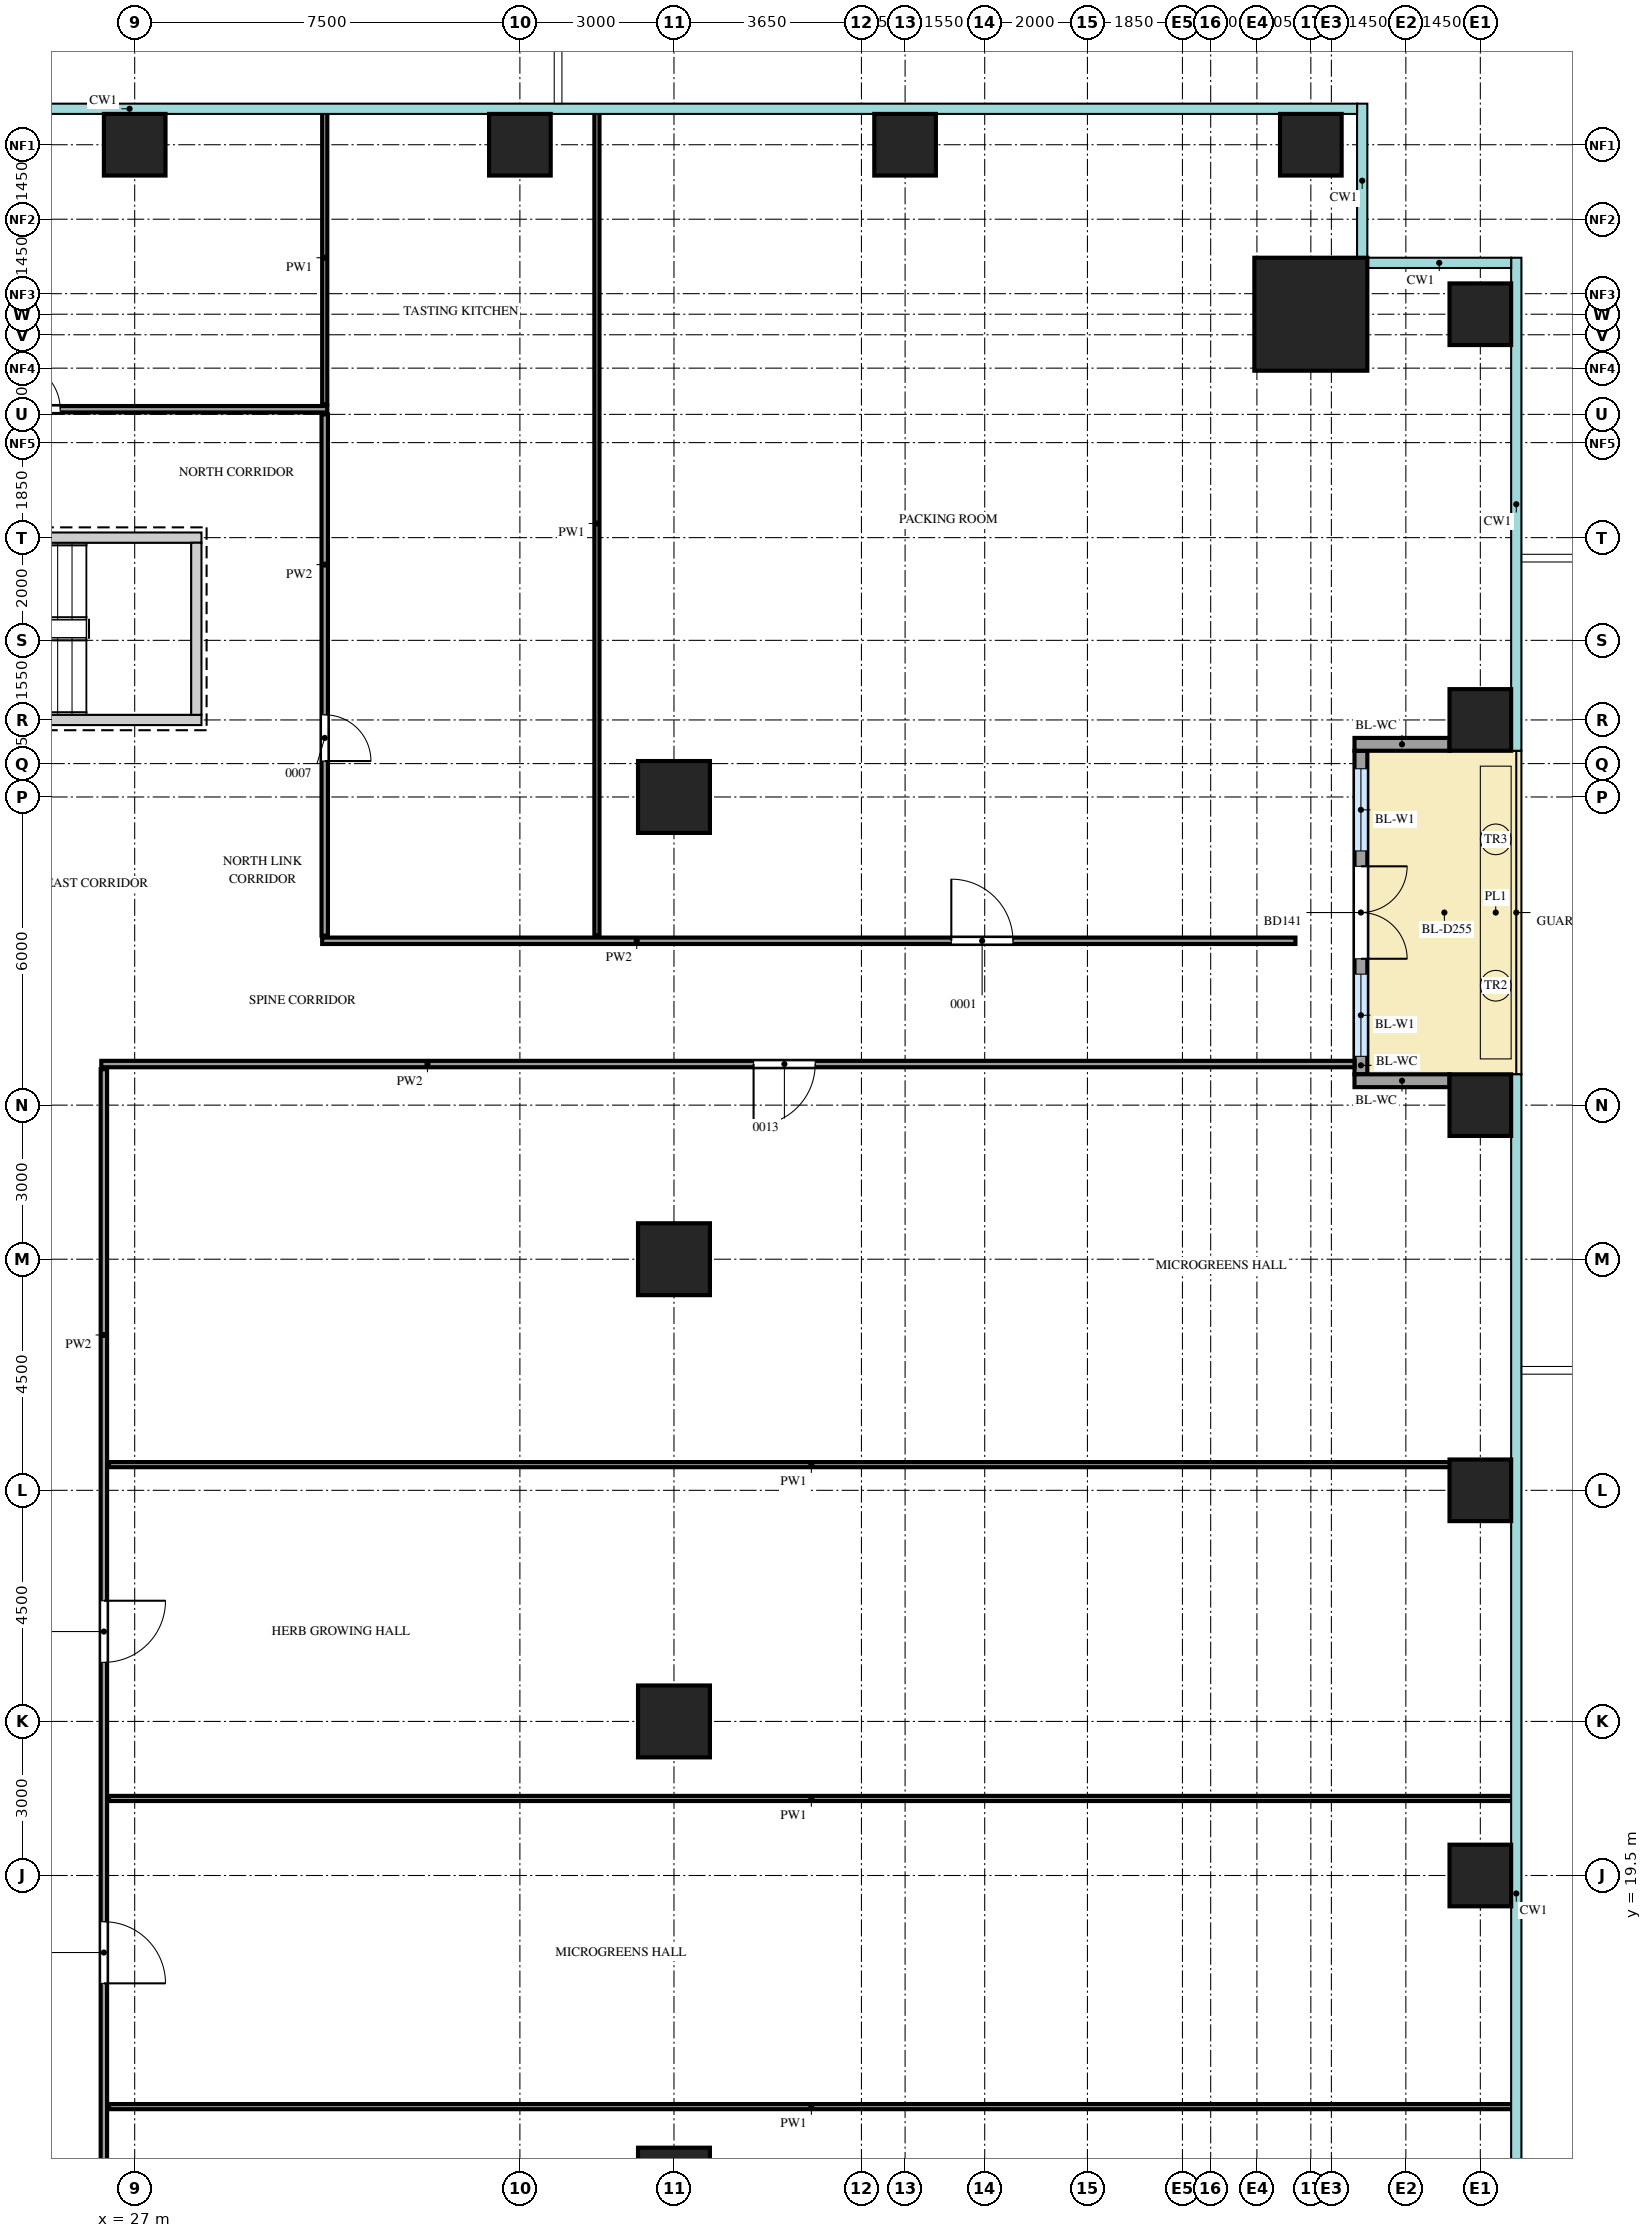
"""IFC4 building model, lengths in metres.
Left out: names, types, materials, properties, quantities, classifications, styles, units other than length and angle.
Written with IfcOpenShell. Run it as: python <this file> out.ifc"""

import sys

from ifc_helpers import new_model, si_unit, direction, frame, frame_2d, origin, origin_2d, place, context, subcontext, project, spatial, rectangle, extrude, source, transform, mapped, element, fill, save


model = new_model("IFC4")
c1 = context("Model", 3, precision=1e-05, world=origin(), true_north=direction((0.0, 1.0)))
c2 = subcontext(c1, "Body", "Model", "MODEL_VIEW")
j1 = project(units=[si_unit("LENGTHUNIT", "METRE"), si_unit("PLANEANGLEUNIT", "RADIAN")], contexts=[c1])
p1 = place(None, origin())
s1 = spatial("IfcSite", under=j1, at=p1, CompositionType="ELEMENT")
p2 = place(p1, origin())
s2 = spatial("IfcBuilding", under=s1, at=p2, CompositionType="ELEMENT")
p3 = place(p2, frame((0.0, 0.0, 69.0)))
s3 = spatial("IfcBuildingStorey", under=s2, at=p3, CompositionType="ELEMENT", Elevation=69.0)
m1 = source(origin(), c2, "Body", "SweptSolid", [
    extrude(rectangle(XDim=7.1, YDim=0.2, at=frame_2d((3.55, 0.0))), origin(), (0.0, 0.0, 1.0), 4.2),
])
p4 = place(p3, frame((21.2, 45.55, 0.0), z_axis=(0.0, 0.0, 1.0), x_axis=(1.0, 0.0, 0.0)))
e1 = element("IfcWall", 1, at=p4, inside=s3, PredefinedType="SHEAR", context=c2, shape_type="MappedRepresentation", body=[
    mapped(m1, transform((0.0, 0.0, 0.0))),
])
m2 = source(origin(), c2, "Body", "SweptSolid", [
    extrude(rectangle(XDim=1.2, YDim=2.1, at=frame_2d((0.6, 1.05))), frame((0.0, 0.11, 0.0), z_axis=(0.0, -1.0, 0.0), x_axis=(1.0, 0.0, 0.0)), (0.0, 0.0, 1.0), 0.22),
])
p5 = place(p4, frame((0.15, 0.0, 0.0)))
e2 = element("IfcOpeningElement", 2, at=p5, cuts=e1, PredefinedType="OPENING", context=c2, shape_type="MappedRepresentation", body=[
    mapped(m2, transform((0.0, 0.0, 0.0))),
])
p6 = place(p3, frame((21.2, 42.0, 0.0), z_axis=(0.0, 0.0, 1.0), x_axis=(1.0, 0.0, 0.0)))
e3 = element("IfcWall", 3, at=p6, inside=s3, PredefinedType="SHEAR", context=c2, shape_type="MappedRepresentation", body=[
    mapped(m1, transform((0.0, 0.0, 0.0))),
])
m3 = source(origin(), c2, "Body", "SweptSolid", [
    extrude(rectangle(XDim=3.35, YDim=0.2, at=frame_2d((1.675, 0.0))), origin(), (0.0, 0.0, 1.0), 4.2),
])
p7 = place(p3, frame((28.2, 42.1, 0.0), z_axis=(0.0, 0.0, 1.0), x_axis=(0.0, 1.0, 0.0)))
e4 = element("IfcWall", 4, at=p7, inside=s3, PredefinedType="SHEAR", context=c2, shape_type="MappedRepresentation", body=[
    mapped(m3, transform((0.0, 0.0, 0.0))),
])
m4 = source(origin(), c2, "Body", "SweptSolid", [
    extrude(rectangle(XDim=2.2, YDim=2.2, at=origin_2d()), origin(), (0.0, 0.0, 1.0), 4.5),
])
p8 = place(p3, frame((49.9, 49.9, 0.0), z_axis=(0.0, 0.0, 1.0), x_axis=(1.0, 0.0, 0.0)))
e5 = element("IfcColumn", 5, at=p8, inside=s3, PredefinedType="COLUMN", context=c2, shape_type="MappedRepresentation", body=[
    mapped(m4, transform((0.0, 0.0, 0.0))),
])
m5 = source(origin(), c2, "Body", "SweptSolid", [
    extrude(rectangle(XDim=1.2, YDim=1.2, at=origin_2d()), origin(), (0.0, 0.0, 1.0), 4.2),
])
for number, where, z_axis, x_axis in (
    (6, (53.2, 19.5, 0.0), (0.0, 0.0, 1.0), (1.0, 0.0, 0.0)),
    (7, (53.2, 27.0, 0.0), (0.0, 0.0, 1.0), (1.0, 0.0, 0.0)),
    (8, (53.2, 34.5, 0.0), (0.0, 0.0, 1.0), (1.0, 0.0, 0.0)),
    (9, (53.2, 42.0, 0.0), (0.0, 0.0, 1.0), (1.0, 0.0, 0.0)),
    (10, (53.2, 49.9, 0.0), (0.0, 0.0, 1.0), (1.0, 0.0, 0.0)),
    (11, (27.0, 53.2, 0.0), (0.0, 0.0, 1.0), (1.0, 0.0, 0.0)),
    (12, (34.5, 53.2, 0.0), (0.0, 0.0, 1.0), (1.0, 0.0, 0.0)),
    (13, (42.0, 53.2, 0.0), (0.0, 0.0, 1.0), (1.0, 0.0, 0.0)),
    (14, (49.9, 53.2, 0.0), (0.0, 0.0, 1.0), (1.0, 0.0, 0.0)),
):
    element("IfcColumn", number, at=place(p3, frame(where, z_axis=z_axis, x_axis=x_axis)), inside=s3, PredefinedType="COLUMN", context=c2, shape_type="MappedRepresentation", body=[
        mapped(m5, transform((0.0, 0.0, 0.0))),
    ])
m6 = source(origin(), c2, "Body", "SweptSolid", [
    extrude(rectangle(XDim=1.4, YDim=1.4, at=origin_2d()), origin(), (0.0, 0.0, 1.0), 4.2),
])
for number, where, z_axis, x_axis in (
    (15, (37.5, 13.5, 0.0), (0.0, 0.0, 1.0), (1.0, 0.0, 0.0)),
    (16, (37.5, 22.5, 0.0), (0.0, 0.0, 1.0), (1.0, 0.0, 0.0)),
    (17, (37.5, 31.5, 0.0), (0.0, 0.0, 1.0), (1.0, 0.0, 0.0)),
    (18, (37.5, 40.5, 0.0), (0.0, 0.0, 1.0), (1.0, 0.0, 0.0)),
):
    element("IfcColumn", number, at=place(p3, frame(where, z_axis=z_axis, x_axis=x_axis)), inside=s3, PredefinedType="COLUMN", context=c2, shape_type="MappedRepresentation", body=[
        mapped(m6, transform((0.0, 0.0, 0.0))),
    ])
m7 = source(origin(), c2, "Body", "SweptSolid", [
    extrude(rectangle(XDim=6.3, YDim=0.25, at=frame_2d((3.15, 0.0))), origin(), (0.0, 0.0, 1.0), 3.6),
])
p9 = place(p3, frame((50.875, 35.1, 0.0), z_axis=(0.0, 0.0, 1.0), x_axis=(0.0, 1.0, 0.0)))
e19 = element("IfcWall", 19, at=p9, inside=s3, PredefinedType="SOLIDWALL", context=c2, shape_type="MappedRepresentation", body=[
    mapped(m7, transform((0.0, 0.0, 0.0))),
])
m8 = source(origin(), c2, "Body", "SweptSolid", [
    extrude(rectangle(XDim=1.6, YDim=2.4, at=frame_2d((0.8, 1.2))), frame((0.0, 0.135, 0.0), z_axis=(0.0, -1.0, 0.0), x_axis=(1.0, 0.0, 0.0)), (0.0, 0.0, 1.0), 0.27),
])
p10 = place(p9, frame((0.35, 0.0, 0.0)))
e20 = element("IfcOpeningElement", 20, at=p10, cuts=e19, PredefinedType="OPENING", context=c2, shape_type="MappedRepresentation", body=[
    mapped(m8, transform((0.0, 0.0, 0.0))),
])
p11 = place(p9, frame((4.35, 0.0, 0.0)))
e21 = element("IfcOpeningElement", 21, at=p11, cuts=e19, PredefinedType="OPENING", context=c2, shape_type="MappedRepresentation", body=[
    mapped(m8, transform((0.0, 0.0, 0.0))),
])
m9 = source(origin(), c2, "Body", "SweptSolid", [
    extrude(rectangle(XDim=1.8, YDim=2.4, at=frame_2d((0.9, 1.2))), frame((0.0, 0.135, 0.0), z_axis=(0.0, -1.0, 0.0), x_axis=(1.0, 0.0, 0.0)), (0.0, 0.0, 1.0), 0.27),
])
p12 = place(p9, frame((2.25, 0.0, 0.0)))
e22 = element("IfcOpeningElement", 22, at=p12, cuts=e19, PredefinedType="OPENING", context=c2, shape_type="MappedRepresentation", body=[
    mapped(m9, transform((0.0, 0.0, 0.0))),
])
m10 = source(origin(), c2, "Body", "SweptSolid", [
    extrude(rectangle(XDim=1.85, YDim=0.25, at=frame_2d((0.925, 0.0))), origin(), (0.0, 0.0, 1.0), 3.6),
])
for number, where, z_axis, x_axis in (
    (23, (52.6, 34.975, 0.0), (0.0, 0.0, 1.0), (-1.0, 0.0, 0.0)),
    (24, (52.6, 41.525, 0.0), (0.0, 0.0, 1.0), (-1.0, 0.0, 0.0)),
):
    element("IfcWall", number, at=place(p3, frame(where, z_axis=z_axis, x_axis=x_axis)), inside=s3, PredefinedType="SOLIDWALL", context=c2, shape_type="MappedRepresentation", body=[
        mapped(m10, transform((0.0, 0.0, 0.0))),
    ])
m11 = source(origin(), c2, "Body", "SweptSolid", [
    extrude(rectangle(XDim=29.05, YDim=0.125, at=frame_2d((14.525, 0.0))), origin(), (0.0, 0.0, 1.0), 4.3),
])
p13 = place(p3, frame((26.4, 6.15, 0.0), z_axis=(0.0, 0.0, 1.0), x_axis=(0.0, 1.0, 0.0)))
e25 = element("IfcWall", 25, at=p13, inside=s3, PredefinedType="PARTITIONING", context=c2, shape_type="MappedRepresentation", body=[
    mapped(m11, transform((0.0, 0.0, 0.0))),
])
m12 = source(origin(), c2, "Body", "SweptSolid", [
    extrude(rectangle(XDim=1.2, YDim=2.1, at=frame_2d((0.6, 1.05))), frame((0.0, 0.073, 0.0), z_axis=(0.0, -1.0, 0.0), x_axis=(1.0, 0.0, 0.0)), (0.0, 0.0, 1.0), 0.145),
])
p14 = place(p13, frame((0.5, 0.0, 0.0)))
e26 = element("IfcOpeningElement", 26, at=p14, cuts=e25, PredefinedType="OPENING", context=c2, shape_type="MappedRepresentation", body=[
    mapped(m12, transform((0.0, 0.0, 0.0))),
])
p15 = place(p13, frame((4.75, 0.0, 0.0)))
e27 = element("IfcOpeningElement", 27, at=p15, cuts=e25, PredefinedType="OPENING", context=c2, shape_type="MappedRepresentation", body=[
    mapped(m12, transform((0.0, 0.0, 0.0))),
])
p16 = place(p13, frame((11.25, 0.0, 0.0)))
e28 = element("IfcOpeningElement", 28, at=p16, cuts=e25, PredefinedType="OPENING", context=c2, shape_type="MappedRepresentation", body=[
    mapped(m12, transform((0.0, 0.0, 0.0))),
])
p17 = place(p13, frame((17.5, 0.0, 0.0)))
e29 = element("IfcOpeningElement", 29, at=p17, cuts=e25, PredefinedType="OPENING", context=c2, shape_type="MappedRepresentation", body=[
    mapped(m12, transform((0.0, 0.0, 0.0))),
])
m13 = source(origin(), c2, "Body", "SweptSolid", [
    extrude(rectangle(XDim=27.35, YDim=0.1, at=frame_2d((13.675, 0.0))), origin(), (0.0, 0.0, 1.0), 4.3),
])
for number, where, z_axis, x_axis in (
    (30, (26.5, 15.0, 0.0), (0.0, 0.0, 1.0), (1.0, 0.0, 0.0)),
    (31, (26.5, 21.0, 0.0), (0.0, 0.0, 1.0), (1.0, 0.0, 0.0)),
    (32, (26.5, 27.5, 0.0), (0.0, 0.0, 1.0), (1.0, 0.0, 0.0)),
):
    element("IfcWall", number, at=place(p3, frame(where, z_axis=z_axis, x_axis=x_axis)), inside=s3, PredefinedType="PARTITIONING", context=c2, shape_type="MappedRepresentation", body=[
        mapped(m13, transform((0.0, 0.0, 0.0))),
    ])
m14 = source(origin(), c2, "Body", "SweptSolid", [
    extrude(rectangle(XDim=24.4, YDim=0.125, at=frame_2d((12.2, 0.0))), origin(), (0.0, 0.0, 1.0), 4.3),
])
p18 = place(p3, frame((26.35, 35.3, 0.0), z_axis=(0.0, 0.0, 1.0), x_axis=(1.0, 0.0, 0.0)))
e33 = element("IfcWall", 33, at=p18, inside=s3, PredefinedType="PARTITIONING", context=c2, shape_type="MappedRepresentation", body=[
    mapped(m14, transform((0.0, 0.0, 0.0))),
])
p19 = place(p18, frame((12.7, 0.0, 0.0)))
e34 = element("IfcOpeningElement", 34, at=p19, cuts=e33, PredefinedType="OPENING", context=c2, shape_type="MappedRepresentation", body=[
    mapped(m12, transform((0.0, 0.0, 0.0))),
])
m15 = source(origin(), c2, "Body", "SweptSolid", [
    extrude(rectangle(XDim=18.95, YDim=0.125, at=frame_2d((9.475, 0.0))), origin(), (0.0, 0.0, 1.0), 4.3),
])
p20 = place(p3, frame((30.65, 37.7, 0.0), z_axis=(0.0, 0.0, 1.0), x_axis=(1.0, 0.0, 0.0)))
e35 = element("IfcWall", 35, at=p20, inside=s3, PredefinedType="PARTITIONING", context=c2, shape_type="MappedRepresentation", body=[
    mapped(m15, transform((0.0, 0.0, 0.0))),
])
p21 = place(p20, frame((12.25, 0.0, 0.0)))
e36 = element("IfcOpeningElement", 36, at=p21, cuts=e35, PredefinedType="OPENING", context=c2, shape_type="MappedRepresentation", body=[
    mapped(m12, transform((0.0, 0.0, 0.0))),
])
m16 = source(origin(), c2, "Body", "SweptSolid", [
    extrude(rectangle(XDim=10.15, YDim=0.125, at=frame_2d((5.075, 0.0))), origin(), (0.0, 0.0, 1.0), 4.3),
])
p22 = place(p3, frame((30.7, 37.8, 0.0), z_axis=(0.0, 0.0, 1.0), x_axis=(0.0, 1.0, 0.0)))
e37 = element("IfcWall", 37, at=p22, inside=s3, PredefinedType="PARTITIONING", context=c2, shape_type="MappedRepresentation", body=[
    mapped(m16, transform((0.0, 0.0, 0.0))),
])
m17 = source(origin(), c2, "Body", "SweptSolid", [
    extrude(rectangle(XDim=0.9, YDim=2.1, at=frame_2d((0.45, 1.05))), frame((0.0, 0.073, 0.0), z_axis=(0.0, -1.0, 0.0), x_axis=(1.0, 0.0, 0.0)), (0.0, 0.0, 1.0), 0.145),
])
p23 = place(p22, frame((3.4, 0.0, 0.0)))
e38 = element("IfcOpeningElement", 38, at=p23, cuts=e37, PredefinedType="OPENING", context=c2, shape_type="MappedRepresentation", body=[
    mapped(m17, transform((0.0, 0.0, 0.0))),
])
m18 = source(origin(), c2, "Body", "SweptSolid", [
    extrude(rectangle(XDim=16.05, YDim=0.1, at=frame_2d((8.025, 0.0))), origin(), (0.0, 0.0, 1.0), 4.3),
])
p24 = place(p3, frame((36.0, 37.8, 0.0), z_axis=(0.0, 0.0, 1.0), x_axis=(0.0, 1.0, 0.0)))
e39 = element("IfcWall", 39, at=p24, inside=s3, PredefinedType="PARTITIONING", context=c2, shape_type="MappedRepresentation", body=[
    mapped(m18, transform((0.0, 0.0, 0.0))),
])
m19 = source(origin(), c2, "Body", "SweptSolid", [
    extrude(rectangle(XDim=26.6, YDim=0.125, at=frame_2d((13.3, 0.0))), origin(), (0.0, 0.0, 1.0), 4.3),
])
p25 = place(p3, frame((4.15, 48.05, 0.0), z_axis=(0.0, 0.0, 1.0), x_axis=(1.0, 0.0, 0.0)))
e40 = element("IfcWall", 40, at=p25, inside=s3, PredefinedType="PARTITIONING", context=c2, shape_type="MappedRepresentation", body=[
    mapped(m19, transform((0.0, 0.0, 0.0))),
])
p26 = place(p25, frame((7.25, 0.0, 0.0)))
e41 = element("IfcOpeningElement", 41, at=p26, cuts=e40, PredefinedType="OPENING", context=c2, shape_type="MappedRepresentation", body=[
    mapped(m17, transform((0.0, 0.0, 0.0))),
])
p27 = place(p25, frame((20.5, 0.0, 0.0)))
e42 = element("IfcOpeningElement", 42, at=p27, cuts=e40, PredefinedType="OPENING", context=c2, shape_type="MappedRepresentation", body=[
    mapped(m17, transform((0.0, 0.0, 0.0))),
])
m20 = source(origin(), c2, "Body", "SweptSolid", [
    extrude(rectangle(XDim=5.7, YDim=0.1, at=frame_2d((2.85, 0.0))), origin(), (0.0, 0.0, 1.0), 4.3),
])
p28 = place(p3, frame((30.7, 48.15, 0.0), z_axis=(0.0, 0.0, 1.0), x_axis=(0.0, 1.0, 0.0)))
e43 = element("IfcWall", 43, at=p28, inside=s3, PredefinedType="PARTITIONING", context=c2, shape_type="MappedRepresentation", body=[
    mapped(m20, transform((0.0, 0.0, 0.0))),
])
m21 = source(origin(), c2, "Body", "SweptSolid", [
    extrude(rectangle(XDim=1.6, YDim=2.4, at=frame_2d((0.8, 1.2))), frame((0.0, 0.03, 0.0), z_axis=(0.0, -1.0, 0.0), x_axis=(1.0, 0.0, 0.0)), (0.0, 0.0, 1.0), 0.06),
])
p29 = place(p10, origin())
e44 = element("IfcWindow", 44, at=p29, inside=s3, PartitioningType="SINGLE_PANEL", PredefinedType="WINDOW", context=c2, shape_type="MappedRepresentation", body=[
    mapped(m21, transform((0.0, 0.0, 0.0))),
])
fill(e20, e44)
p30 = place(p11, origin())
e45 = element("IfcWindow", 45, at=p30, inside=s3, PartitioningType="SINGLE_PANEL", PredefinedType="WINDOW", context=c2, shape_type="MappedRepresentation", body=[
    mapped(m21, transform((0.0, 0.0, 0.0))),
])
fill(e21, e45)
m22 = source(origin(), c2, "Body", "SweptSolid", [
    extrude(rectangle(XDim=1.8, YDim=2.4, at=frame_2d((0.9, 1.2))), frame((0.0, 0.025, 0.0), z_axis=(0.0, -1.0, 0.0), x_axis=(1.0, 0.0, 0.0)), (0.0, 0.0, 1.0), 0.05),
])
p31 = place(p12, origin())
e46 = element("IfcDoor", 46, at=p31, inside=s3, OperationType="DOUBLE_DOOR_DOUBLE_SWING", PredefinedType="DOOR", context=c2, shape_type="MappedRepresentation", body=[
    mapped(m22, transform((0.0, 0.0, 0.0))),
])
fill(e22, e46)
m23 = source(origin(), c2, "Body", "SweptSolid", [
    extrude(rectangle(XDim=1.2, YDim=2.1, at=frame_2d((0.6, 1.05))), frame((0.0, 0.025, 0.0), z_axis=(0.0, -1.0, 0.0), x_axis=(1.0, 0.0, 0.0)), (0.0, 0.0, 1.0), 0.05),
])
p32 = place(p16, origin())
e47 = element("IfcDoor", 47, at=p32, inside=s3, OperationType="SINGLE_SWING_LEFT", PredefinedType="DOOR", context=c2, shape_type="MappedRepresentation", body=[
    mapped(m23, transform((0.0, 0.0, 0.0))),
])
fill(e28, e47)
p33 = place(p17, origin())
e48 = element("IfcDoor", 48, at=p33, inside=s3, OperationType="SINGLE_SWING_RIGHT", PredefinedType="DOOR", context=c2, shape_type="MappedRepresentation", body=[
    mapped(m23, transform((0.0, 0.0, 0.0))),
])
fill(e29, e48)
p34 = place(p19, origin())
e49 = element("IfcDoor", 49, at=p34, inside=s3, OperationType="SINGLE_SWING_LEFT", PredefinedType="DOOR", context=c2, shape_type="MappedRepresentation", body=[
    mapped(m23, transform((0.0, 0.0, 0.0))),
])
fill(e34, e49)
m24 = source(origin(), c2, "Body", "SweptSolid", [
    extrude(rectangle(XDim=0.9, YDim=2.1, at=frame_2d((0.45, 1.05))), frame((0.0, 0.025, 0.0), z_axis=(0.0, -1.0, 0.0), x_axis=(1.0, 0.0, 0.0)), (0.0, 0.0, 1.0), 0.05),
])
p35 = place(p23, origin())
e50 = element("IfcDoor", 50, at=p35, inside=s3, OperationType="SINGLE_SWING_LEFT", PredefinedType="DOOR", context=c2, shape_type="MappedRepresentation", body=[
    mapped(m24, transform((0.0, 0.0, 0.0))),
])
fill(e38, e50)
p36 = place(p21, origin())
e51 = element("IfcDoor", 51, at=p36, inside=s3, OperationType="SINGLE_SWING_RIGHT", PredefinedType="DOOR", context=c2, shape_type="MappedRepresentation", body=[
    mapped(m23, transform((0.0, 0.0, 0.0))),
])
fill(e36, e51)
p37 = place(p27, origin())
e52 = element("IfcDoor", 52, at=p37, inside=s3, OperationType="SINGLE_SWING_RIGHT", PredefinedType="DOOR", context=c2, shape_type="MappedRepresentation", body=[
    mapped(m24, transform((0.0, 0.0, 0.0))),
])
fill(e42, e52)
save(model, sys.argv[1])
